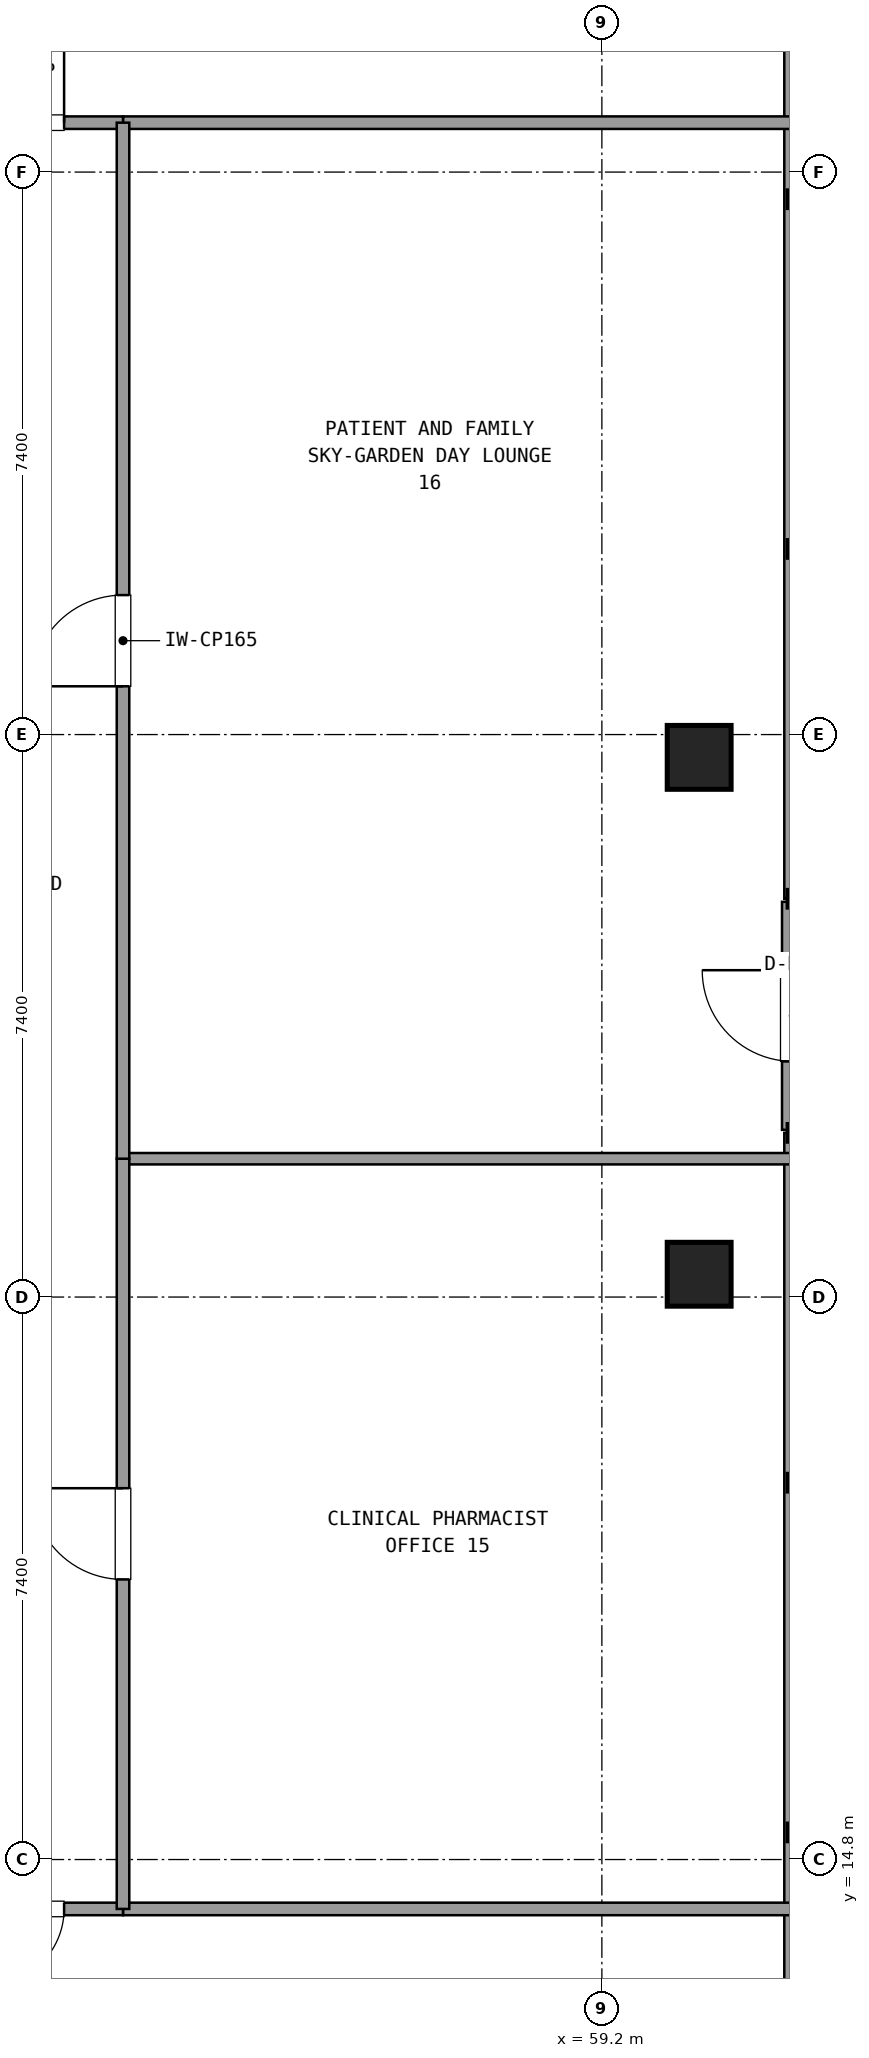
"""IFC4 building model, lengths in metres.
Left out: names, types, materials, properties, quantities, classifications, styles, units other than length and angle.
Written with IfcOpenShell. Run it as: python <this file> out.ifc"""

import sys

from ifc_helpers import new_model, si_unit, direction, frame, frame_2d, origin, origin_2d, place, context, subcontext, project, spatial, rectangle, extrude, element, fill, save


model = new_model("IFC4")
c1 = context("Model", 3, precision=1e-05, world=origin(), true_north=direction((0.0, 1.0)))
c2 = subcontext(c1, "Body", "Model", "MODEL_VIEW")
j1 = project(units=[si_unit("LENGTHUNIT", "METRE"), si_unit("PLANEANGLEUNIT", "RADIAN")], contexts=[c1])
p1 = place(None, origin())
s1 = spatial("IfcSite", under=j1, at=p1, CompositionType="ELEMENT")
p2 = place(p1, origin())
s2 = spatial("IfcBuilding", under=s1, at=p2, CompositionType="ELEMENT")
p3 = place(p2, frame((0.0, 0.0, 246.42)))
s3 = spatial("IfcBuildingStorey", under=s2, at=p3, CompositionType="ELEMENT", Elevation=246.42)
for number, where, z_axis, x_axis in (
    (1, (60.48, 22.5, 0.0), (0.0, 0.0, 1.0), (1.0, 0.0, 0.0)),
    (2, (60.48, 29.3, 0.0), (0.0, 0.0, 1.0), (1.0, 0.0, 0.0)),
):
    element("IfcColumn", number, at=place(p3, frame(where, z_axis=z_axis, x_axis=x_axis)), inside=s3, PredefinedType="COLUMN", context=c2, shape_type="SweptSolid", body=[
        extrude(rectangle(XDim=0.84, YDim=0.84, at=origin_2d()), origin(), (0.0, 0.0, 1.0), 3.6),
    ])
p4 = place(p3, frame((61.72, 24.4, 0.0), z_axis=(0.0, 0.0, 1.0), x_axis=(0.0, 1.0, 0.0)))
e3 = element("IfcWall", 3, at=p4, inside=s3, PredefinedType="SOLIDWALL", context=c2, shape_type="SweptSolid", body=[
    extrude(rectangle(XDim=3.0, YDim=0.3, at=frame_2d((1.5, 0.0))), origin(), (0.0, 0.0, 1.0), 2.69),
])
p5 = place(p4, frame((0.9, 0.0, 0.0)))
e4 = element("IfcOpeningElement", 4, at=p5, cuts=e3, PredefinedType="OPENING", context=c2, shape_type="SweptSolid", body=[
    extrude(rectangle(XDim=1.2, YDim=2.2, at=frame_2d((0.6, 1.1))), frame((0.0, 0.16, 0.0), z_axis=(0.0, -1.0, 0.0), x_axis=(1.0, 0.0, 0.0)), (0.0, 0.0, 1.0), 0.32),
])
for number, where, z_axis, x_axis in (
    (5, (61.72, 10.555, 0.0), (0.0, 0.0, 1.0), (0.0, 1.0, 0.0)),
    (6, (61.72, 27.44, 0.0), (0.0, 0.0, 1.0), (0.0, 1.0, 0.0)),
):
    element("IfcWall", number, at=place(p3, frame(where, z_axis=z_axis, x_axis=x_axis)), inside=s3, PredefinedType="SOLIDWALL", context=c2, shape_type="SweptSolid", body=[
        extrude(rectangle(XDim=13.805, YDim=0.24, at=frame_2d((6.903, 0.0))), origin(), (0.0, 0.0, 1.0), 0.85),
    ])
for number, where, z_axis, x_axis in (
    (7, (52.9, 37.65, 0.0), (0.0, 0.0, 1.0), (1.0, 0.0, 0.0)),
    (8, (52.9, 14.15, 0.0), (0.0, 0.0, 1.0), (1.0, 0.0, 0.0)),
):
    element("IfcWall", number, at=place(p3, frame(where, z_axis=z_axis, x_axis=x_axis)), inside=s3, PredefinedType="PARTITIONING", context=c2, shape_type="SweptSolid", body=[
        extrude(rectangle(XDim=8.8, YDim=0.165, at=frame_2d((4.4, 0.0))), origin(), (0.0, 0.0, 1.0), 2.61),
    ])
p6 = place(p3, frame((50.35, 37.65, 0.0), z_axis=(0.0, 0.0, 1.0), x_axis=(1.0, 0.0, 0.0)))
e9 = element("IfcWall", 9, at=p6, inside=s3, PredefinedType="PARTITIONING", context=c2, shape_type="SweptSolid", body=[
    extrude(rectangle(XDim=2.55, YDim=0.165, at=frame_2d((1.275, 0.0))), origin(), (0.0, 0.0, 1.0), 2.61),
])
p7 = place(p6, frame((0.775, 0.0, 0.0)))
e10 = element("IfcOpeningElement", 10, at=p7, cuts=e9, PredefinedType="OPENING", context=c2, shape_type="SweptSolid", body=[
    extrude(rectangle(XDim=1.0, YDim=2.15, at=frame_2d((0.5, 1.075))), frame((0.0, 0.093, 0.0), z_axis=(0.0, -1.0, 0.0), x_axis=(1.0, 0.0, 0.0)), (0.0, 0.0, 1.0), 0.185),
])
p8 = place(p3, frame((50.35, 14.15, 0.0), z_axis=(0.0, 0.0, 1.0), x_axis=(1.0, 0.0, 0.0)))
e11 = element("IfcWall", 11, at=p8, inside=s3, PredefinedType="PARTITIONING", context=c2, shape_type="SweptSolid", body=[
    extrude(rectangle(XDim=2.55, YDim=0.165, at=frame_2d((1.275, 0.0))), origin(), (0.0, 0.0, 1.0), 2.61),
])
p9 = place(p8, frame((0.775, 0.0, 0.0)))
e12 = element("IfcOpeningElement", 12, at=p9, cuts=e11, PredefinedType="OPENING", context=c2, shape_type="SweptSolid", body=[
    extrude(rectangle(XDim=1.0, YDim=2.15, at=frame_2d((0.5, 1.075))), frame((0.0, 0.093, 0.0), z_axis=(0.0, -1.0, 0.0), x_axis=(1.0, 0.0, 0.0)), (0.0, 0.0, 1.0), 0.185),
])
p10 = place(p3, frame((52.9, 24.02, 0.0), z_axis=(0.0, 0.0, 1.0), x_axis=(1.0, 0.0, 0.0)))
e13 = element("IfcWall", 13, at=p10, inside=s3, PredefinedType="PARTITIONING", context=c2, shape_type="SweptSolid", body=[
    extrude(rectangle(XDim=8.8, YDim=0.15, at=frame_2d((4.4, 0.0))), origin(), (0.0, 0.0, 1.0), 2.61),
])
p11 = place(p3, frame((52.9, 14.15, 0.0), z_axis=(0.0, 0.0, 1.0), x_axis=(0.0, 1.0, 0.0)))
e14 = element("IfcWall", 14, at=p11, inside=s3, PredefinedType="PARTITIONING", context=c2, shape_type="SweptSolid", body=[
    extrude(rectangle(XDim=9.87, YDim=0.165, at=frame_2d((4.935, 0.0))), origin(), (0.0, 0.0, 1.0), 2.61),
])
p12 = place(p11, frame((4.335, 0.0, 0.0)))
e15 = element("IfcOpeningElement", 15, at=p12, cuts=e14, PredefinedType="OPENING", context=c2, shape_type="SweptSolid", body=[
    extrude(rectangle(XDim=1.2, YDim=2.15, at=frame_2d((0.6, 1.075))), frame((0.0, 0.093, 0.0), z_axis=(0.0, -1.0, 0.0), x_axis=(1.0, 0.0, 0.0)), (0.0, 0.0, 1.0), 0.185),
])
p13 = place(p3, frame((52.9, 24.02, 0.0), z_axis=(0.0, 0.0, 1.0), x_axis=(0.0, 1.0, 0.0)))
e16 = element("IfcWall", 16, at=p13, inside=s3, PredefinedType="PARTITIONING", context=c2, shape_type="SweptSolid", body=[
    extrude(rectangle(XDim=13.63, YDim=0.165, at=frame_2d((6.815, 0.0))), origin(), (0.0, 0.0, 1.0), 2.61),
])
p14 = place(p13, frame((6.215, 0.0, 0.0)))
e17 = element("IfcOpeningElement", 17, at=p14, cuts=e16, PredefinedType="OPENING", context=c2, shape_type="SweptSolid", body=[
    extrude(rectangle(XDim=1.2, YDim=2.15, at=frame_2d((0.6, 1.075))), frame((0.0, 0.093, 0.0), z_axis=(0.0, -1.0, 0.0), x_axis=(1.0, 0.0, 0.0)), (0.0, 0.0, 1.0), 0.185),
])
p15 = place(p7, origin())
e18 = element("IfcDoor", 18, at=p15, inside=s3, OperationType="SINGLE_SWING_RIGHT", PredefinedType="DOOR", context=c2, shape_type="SweptSolid", body=[
    extrude(rectangle(XDim=1.0, YDim=2.15, at=frame_2d((0.5, 1.075))), frame((0.0, 0.025, 0.0), z_axis=(0.0, -1.0, 0.0), x_axis=(1.0, 0.0, 0.0)), (0.0, 0.0, 1.0), 0.05),
])
fill(e10, e18)
p16 = place(p9, frame((1.0, 0.0, 0.0), z_axis=(0.0, 0.0, 1.0), x_axis=(-1.0, 0.0, 0.0)))
e19 = element("IfcDoor", 19, at=p16, inside=s3, OperationType="SINGLE_SWING_LEFT", PredefinedType="DOOR", context=c2, shape_type="SweptSolid", body=[
    extrude(rectangle(XDim=1.0, YDim=2.15, at=frame_2d((0.5, 1.075))), frame((0.0, 0.025, 0.0), z_axis=(0.0, -1.0, 0.0), x_axis=(1.0, 0.0, 0.0)), (0.0, 0.0, 1.0), 0.05),
])
fill(e12, e19)
p17 = place(p12, origin())
e20 = element("IfcDoor", 20, at=p17, inside=s3, OperationType="SINGLE_SWING_RIGHT", PredefinedType="DOOR", context=c2, shape_type="SweptSolid", body=[
    extrude(rectangle(XDim=1.2, YDim=2.15, at=frame_2d((0.6, 1.075))), frame((0.0, 0.025, 0.0), z_axis=(0.0, -1.0, 0.0), x_axis=(1.0, 0.0, 0.0)), (0.0, 0.0, 1.0), 0.05),
])
fill(e15, e20)
p18 = place(p14, origin())
e21 = element("IfcDoor", 21, at=p18, inside=s3, OperationType="SINGLE_SWING_LEFT", PredefinedType="DOOR", context=c2, shape_type="SweptSolid", body=[
    extrude(rectangle(XDim=1.2, YDim=2.15, at=frame_2d((0.6, 1.075))), frame((0.0, 0.025, 0.0), z_axis=(0.0, -1.0, 0.0), x_axis=(1.0, 0.0, 0.0)), (0.0, 0.0, 1.0), 0.05),
])
fill(e17, e21)
save(model, sys.argv[1])
